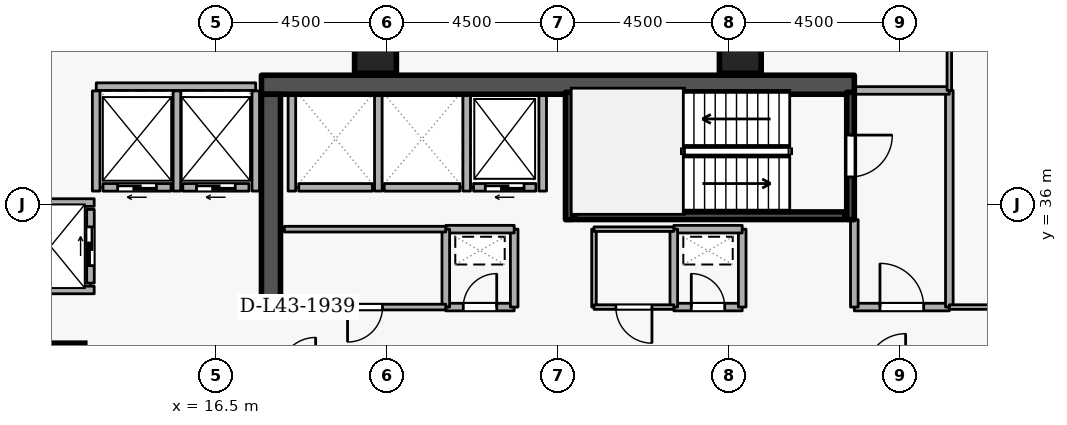
"""IFC4 building model, lengths in metres.
Left out: names, types, materials, properties, quantities, classifications, styles, units other than length and angle.
Written with IfcOpenShell. Run it as: python <this file> out.ifc"""

import sys

from ifc_helpers import new_model, si_unit, direction, frame, frame_2d, origin, origin_2d, place, context, subcontext, project, spatial, rectangle, extrude, element, fill, save


model = new_model("IFC4")
c1 = context("Model", 3, precision=1e-05, world=origin(), true_north=direction((0.0, 1.0)))
c2 = subcontext(c1, "Body", "Model", "MODEL_VIEW")
j1 = project(units=[si_unit("LENGTHUNIT", "METRE"), si_unit("PLANEANGLEUNIT", "RADIAN")], contexts=[c1])
p1 = place(None, origin())
s1 = spatial("IfcSite", under=j1, at=p1, CompositionType="ELEMENT")
p2 = place(p1, origin())
s2 = spatial("IfcBuilding", under=s1, at=p2, CompositionType="ELEMENT")
p3 = place(p2, frame((0.0, 0.0, 163.5)))
s3 = spatial("IfcBuildingStorey", under=s2, at=p3, CompositionType="ELEMENT", Elevation=163.5)
p4 = place(p3, frame((17.7, 39.15, 0.0), z_axis=(0.0, 0.0, 1.0), x_axis=(1.0, 0.0, 0.0)))
e1 = element("IfcWall", 1, at=p4, inside=s3, PredefinedType="SHEAR", context=c2, shape_type="SweptSolid", body=[
    extrude(rectangle(XDim=15.6, YDim=0.5, at=frame_2d((7.8, 0.0))), origin(), (0.0, 0.0, 1.0), 3.6),
])
p5 = place(p3, frame((17.95, 33.1, 0.0), z_axis=(0.0, 0.0, 1.0), x_axis=(0.0, 1.0, 0.0)))
e2 = element("IfcWall", 2, at=p5, inside=s3, PredefinedType="SHEAR", context=c2, shape_type="SweptSolid", body=[
    extrude(rectangle(XDim=5.8, YDim=0.5, at=frame_2d((2.9, 0.0))), origin(), (0.0, 0.0, 1.0), 3.6),
])
for number, where, z_axis, x_axis in (
    (3, (12.5, 31.8, 0.0), (0.0, 0.0, 1.0), (1.0, 0.0, 0.0)),
    (4, (20.7, 40.0, 0.0), (0.0, 0.0, 1.0), (1.0, 0.0, 0.0)),
    (5, (30.3, 40.0, 0.0), (0.0, 0.0, 1.0), (1.0, 0.0, 0.0)),
):
    element("IfcColumn", number, at=place(p3, frame(where, z_axis=z_axis, x_axis=x_axis)), inside=s3, PredefinedType="COLUMN", context=c2, shape_type="SweptSolid", body=[
        extrude(rectangle(XDim=1.1, YDim=1.1, at=origin_2d()), origin(), (0.0, 0.0, 1.0), 3.6),
    ])
p6 = place(p3, frame((24.92, 36.45, 0.0), z_axis=(0.0, 0.0, 1.0), x_axis=(-1.0, 0.0, 0.0)))
e6 = element("IfcWall", 6, at=p6, inside=s3, PredefinedType="STANDARD", context=c2, shape_type="SweptSolid", body=[
    extrude(rectangle(XDim=1.64, YDim=0.2, at=frame_2d((0.82, 0.0))), origin(), (0.0, 0.0, 1.0), 3.34),
])
p7 = place(p6, frame((0.31, 0.0, 0.0)))
e7 = element("IfcOpeningElement", 7, at=p7, cuts=e6, PredefinedType="OPENING", context=c2, shape_type="SweptSolid", body=[
    extrude(rectangle(XDim=1.02, YDim=2.06, at=frame_2d((0.51, 1.03))), frame((0.0, 0.11, 0.0), z_axis=(0.0, -1.0, 0.0), x_axis=(1.0, 0.0, 0.0)), (0.0, 0.0, 1.0), 0.22),
])
p8 = place(p3, frame((22.92, 36.45, 0.0), z_axis=(0.0, 0.0, 1.0), x_axis=(-1.0, 0.0, 0.0)))
e8 = element("IfcWall", 8, at=p8, inside=s3, PredefinedType="STANDARD", context=c2, shape_type="SweptSolid", body=[
    extrude(rectangle(XDim=1.99, YDim=0.2, at=frame_2d((0.995, 0.0))), origin(), (0.0, 0.0, 1.0), 3.34),
])
p9 = place(p3, frame((20.62, 36.45, 0.0), z_axis=(0.0, 0.0, 1.0), x_axis=(-1.0, 0.0, 0.0)))
e9 = element("IfcWall", 9, at=p9, inside=s3, PredefinedType="STANDARD", context=c2, shape_type="SweptSolid", body=[
    extrude(rectangle(XDim=1.94, YDim=0.2, at=frame_2d((0.97, 0.0))), origin(), (0.0, 0.0, 1.0), 3.34),
])
p10 = place(p3, frame((17.37, 36.45, 0.0), z_axis=(0.0, 0.0, 1.0), x_axis=(-1.0, 0.0, 0.0)))
e10 = element("IfcWall", 10, at=p10, inside=s3, PredefinedType="STANDARD", context=c2, shape_type="SweptSolid", body=[
    extrude(rectangle(XDim=1.74, YDim=0.2, at=frame_2d((0.87, 0.0))), origin(), (0.0, 0.0, 1.0), 3.34),
])
p11 = place(p10, frame((0.36, 0.0, 0.0)))
e11 = element("IfcOpeningElement", 11, at=p11, cuts=e10, PredefinedType="OPENING", context=c2, shape_type="SweptSolid", body=[
    extrude(rectangle(XDim=1.02, YDim=2.06, at=frame_2d((0.51, 1.03))), frame((0.0, 0.11, 0.0), z_axis=(0.0, -1.0, 0.0), x_axis=(1.0, 0.0, 0.0)), (0.0, 0.0, 1.0), 0.22),
])
p12 = place(p3, frame((15.32, 36.45, 0.0), z_axis=(0.0, 0.0, 1.0), x_axis=(-1.0, 0.0, 0.0)))
e12 = element("IfcWall", 12, at=p12, inside=s3, PredefinedType="STANDARD", context=c2, shape_type="SweptSolid", body=[
    extrude(rectangle(XDim=1.79, YDim=0.2, at=frame_2d((0.895, 0.0))), origin(), (0.0, 0.0, 1.0), 3.34),
])
p13 = place(p12, frame((0.385, 0.0, 0.0)))
e13 = element("IfcOpeningElement", 13, at=p13, cuts=e12, PredefinedType="OPENING", context=c2, shape_type="SweptSolid", body=[
    extrude(rectangle(XDim=1.02, YDim=2.06, at=frame_2d((0.51, 1.03))), frame((0.0, 0.11, 0.0), z_axis=(0.0, -1.0, 0.0), x_axis=(1.0, 0.0, 0.0)), (0.0, 0.0, 1.0), 0.22),
])
p14 = place(p3, frame((13.2, 33.93, 0.0), z_axis=(0.0, 0.0, 1.0), x_axis=(0.0, 1.0, 0.0)))
e14 = element("IfcWall", 14, at=p14, inside=s3, PredefinedType="STANDARD", context=c2, shape_type="SweptSolid", body=[
    extrude(rectangle(XDim=1.94, YDim=0.2, at=frame_2d((0.97, 0.0))), origin(), (0.0, 0.0, 1.0), 3.34),
])
p15 = place(p14, frame((0.46, 0.0, 0.0)))
e15 = element("IfcOpeningElement", 15, at=p15, cuts=e14, PredefinedType="OPENING", context=c2, shape_type="SweptSolid", body=[
    extrude(rectangle(XDim=1.02, YDim=2.06, at=frame_2d((0.51, 1.03))), frame((0.0, 0.11, 0.0), z_axis=(0.0, -1.0, 0.0), x_axis=(1.0, 0.0, 0.0)), (0.0, 0.0, 1.0), 0.22),
])
for number, where, z_axis, x_axis in (
    (16, (25.1, 36.352, 0.0), (0.0, 0.0, 1.0), (0.0, 1.0, 0.0)),
    (17, (23.1, 36.352, 0.0), (0.0, 0.0, 1.0), (0.0, 1.0, 0.0)),
    (18, (20.775, 36.352, 0.0), (0.0, 0.0, 1.0), (0.0, 1.0, 0.0)),
    (19, (18.5, 36.352, 0.0), (0.0, 0.0, 1.0), (0.0, 1.0, 0.0)),
):
    element("IfcWall", number, at=place(p3, frame(where, z_axis=z_axis, x_axis=x_axis)), inside=s3, PredefinedType="STANDARD", context=c2, shape_type="SweptSolid", body=[
        extrude(rectangle(XDim=2.536, YDim=0.2, at=frame_2d((1.268, 0.0))), origin(), (0.0, 0.0, 1.0), 3.34),
    ])
p16 = place(p3, frame((13.352, 39.1, 0.0), z_axis=(0.0, 0.0, 1.0), x_axis=(1.0, 0.0, 0.0)))
e20 = element("IfcWall", 20, at=p16, inside=s3, PredefinedType="STANDARD", context=c2, shape_type="SweptSolid", body=[
    extrude(rectangle(XDim=4.196, YDim=0.2, at=frame_2d((2.098, 0.0))), origin(), (0.0, 0.0, 1.0), 3.34),
])
p17 = place(p3, frame((17.55, 36.352, 0.0), z_axis=(0.0, 0.0, 1.0), x_axis=(0.0, 1.0, 0.0)))
e21 = element("IfcWall", 21, at=p17, inside=s3, PredefinedType="STANDARD", context=c2, shape_type="SweptSolid", body=[
    extrude(rectangle(XDim=2.636, YDim=0.2, at=frame_2d((1.318, 0.0))), origin(), (0.0, 0.0, 1.0), 2.545),
])
for number, where, z_axis, x_axis in (
    (22, (15.475, 36.352, 0.0), (0.0, 0.0, 1.0), (0.0, 1.0, 0.0)),
    (23, (13.35, 36.352, 0.0), (0.0, 0.0, 1.0), (0.0, 1.0, 0.0)),
):
    element("IfcWall", number, at=place(p3, frame(where, z_axis=z_axis, x_axis=x_axis)), inside=s3, PredefinedType="STANDARD", context=c2, shape_type="SweptSolid", body=[
        extrude(rectangle(XDim=2.636, YDim=0.2, at=frame_2d((1.318, 0.0))), origin(), (0.0, 0.0, 1.0), 3.34),
    ])
for number, where, z_axis, x_axis in (
    (24, (11.002, 36.05, 0.0), (0.0, 0.0, 1.0), (1.0, 0.0, 0.0)),
    (25, (11.002, 33.75, 0.0), (0.0, 0.0, 1.0), (1.0, 0.0, 0.0)),
):
    element("IfcWall", number, at=place(p3, frame(where, z_axis=z_axis, x_axis=x_axis)), inside=s3, PredefinedType="STANDARD", context=c2, shape_type="SweptSolid", body=[
        extrude(rectangle(XDim=2.296, YDim=0.2, at=frame_2d((1.148, 0.0))), origin(), (0.0, 0.0, 1.0), 3.34),
    ])
p18 = place(p3, frame((33.2, 38.95, 0.0), z_axis=(0.0, 0.0, 1.0), x_axis=(0.0, -1.0, 0.0)))
e26 = element("IfcWall", 26, at=p18, inside=s3, PredefinedType="SHEAR", context=c2, shape_type="SweptSolid", body=[
    extrude(rectangle(XDim=3.35, YDim=0.2, at=frame_2d((1.675, 0.0))), origin(), (0.0, 0.0, 1.0), 3.6),
])
p19 = place(p18, frame((1.125, 0.0, 0.0)))
e27 = element("IfcOpeningElement", 27, at=p19, cuts=e26, PredefinedType="OPENING", context=c2, shape_type="SweptSolid", body=[
    extrude(rectangle(XDim=1.1, YDim=2.1, at=frame_2d((0.55, 1.05))), frame((0.0, 0.11, 0.0), z_axis=(0.0, -1.0, 0.0), x_axis=(1.0, 0.0, 0.0)), (0.0, 0.0, 1.0), 0.22),
])
p20 = place(p3, frame((25.8, 35.6, 0.0), z_axis=(0.0, 0.0, 1.0), x_axis=(0.0, 1.0, 0.0)))
e28 = element("IfcWall", 28, at=p20, inside=s3, PredefinedType="SHEAR", context=c2, shape_type="SweptSolid", body=[
    extrude(rectangle(XDim=3.35, YDim=0.2, at=frame_2d((1.675, 0.0))), origin(), (0.0, 0.0, 1.0), 3.6),
])
p21 = place(p3, frame((25.95, 35.703, 0.0), z_axis=(0.0, 0.0, 1.0), x_axis=(1.0, 0.0, 0.0)))
e29 = element("IfcWall", 29, at=p21, inside=s3, PredefinedType="SHEAR", context=c2, shape_type="SweptSolid", body=[
    extrude(rectangle(XDim=7.1, YDim=0.2, at=frame_2d((3.55, 0.0))), origin(), (0.0, 0.0, 1.0), 3.6),
])
p22 = place(p3, frame((33.3, 33.3, 0.0), z_axis=(0.0, 0.0, 1.0), x_axis=(1.0, 0.0, 0.0)))
e30 = element("IfcWall", 30, at=p22, inside=s3, PredefinedType="STANDARD", context=c2, shape_type="SweptSolid", body=[
    extrude(rectangle(XDim=2.5, YDim=0.2, at=frame_2d((1.25, 0.0))), origin(), (0.0, 0.0, 1.0), 3.34),
])
p23 = place(p22, frame((0.675, 0.0, 0.0)))
e31 = element("IfcOpeningElement", 31, at=p23, cuts=e30, PredefinedType="OPENING", context=c2, shape_type="SweptSolid", body=[
    extrude(rectangle(XDim=1.15, YDim=2.1, at=frame_2d((0.575, 1.05))), frame((0.0, 0.11, 0.0), z_axis=(0.0, -1.0, 0.0), x_axis=(1.0, 0.0, 0.0)), (0.0, 0.0, 1.0), 0.22),
])
p24 = place(p3, frame((35.8, 33.3, 0.0), z_axis=(0.0, 0.0, 1.0), x_axis=(0.0, 1.0, 0.0)))
e32 = element("IfcWall", 32, at=p24, inside=s3, PredefinedType="STANDARD", context=c2, shape_type="SweptSolid", body=[
    extrude(rectangle(XDim=5.7, YDim=0.2, at=frame_2d((2.85, 0.0))), origin(), (0.0, 0.0, 1.0), 3.34),
])
p25 = place(p3, frame((35.8, 39.0, 0.0), z_axis=(0.0, 0.0, 1.0), x_axis=(-1.0, 0.0, 0.0)))
e33 = element("IfcWall", 33, at=p25, inside=s3, PredefinedType="STANDARD", context=c2, shape_type="SweptSolid", body=[
    extrude(rectangle(XDim=2.5, YDim=0.2, at=frame_2d((1.25, 0.0))), origin(), (0.0, 0.0, 1.0), 3.34),
])
p26 = place(p3, frame((33.3, 35.6, 0.0), z_axis=(0.0, 0.0, 1.0), x_axis=(0.0, -1.0, 0.0)))
e34 = element("IfcWall", 34, at=p26, inside=s3, PredefinedType="STANDARD", context=c2, shape_type="SweptSolid", body=[
    extrude(rectangle(XDim=2.3, YDim=0.2, at=frame_2d((1.15, 0.0))), origin(), (0.0, 0.0, 1.0), 2.545),
])
p27 = place(p3, frame((22.55, 33.3, 0.0), z_axis=(0.0, 0.0, 1.0), x_axis=(1.0, 0.0, 0.0)))
e35 = element("IfcWall", 35, at=p27, inside=s3, PredefinedType="STANDARD", context=c2, shape_type="SweptSolid", body=[
    extrude(rectangle(XDim=1.8, YDim=0.2, at=frame_2d((0.9, 0.0))), origin(), (0.0, 0.0, 1.0), 3.34),
])
p28 = place(p27, frame((0.46, 0.0, 0.0)))
e36 = element("IfcOpeningElement", 36, at=p28, cuts=e35, PredefinedType="OPENING", context=c2, shape_type="SweptSolid", body=[
    extrude(rectangle(XDim=0.88, YDim=2.04, at=frame_2d((0.44, 1.02))), frame((0.0, 0.11, 0.0), z_axis=(0.0, -1.0, 0.0), x_axis=(1.0, 0.0, 0.0)), (0.0, 0.0, 1.0), 0.22),
])
p29 = place(p3, frame((24.35, 33.3, 0.0), z_axis=(0.0, 0.0, 1.0), x_axis=(0.0, 1.0, 0.0)))
e37 = element("IfcWall", 37, at=p29, inside=s3, PredefinedType="STANDARD", context=c2, shape_type="SweptSolid", body=[
    extrude(rectangle(XDim=2.05, YDim=0.2, at=frame_2d((1.025, 0.0))), origin(), (0.0, 0.0, 1.0), 3.34),
])
p30 = place(p3, frame((24.35, 35.35, 0.0), z_axis=(0.0, 0.0, 1.0), x_axis=(-1.0, 0.0, 0.0)))
e38 = element("IfcWall", 38, at=p30, inside=s3, PredefinedType="STANDARD", context=c2, shape_type="SweptSolid", body=[
    extrude(rectangle(XDim=1.8, YDim=0.2, at=frame_2d((0.9, 0.0))), origin(), (0.0, 0.0, 1.0), 3.34),
])
p31 = place(p3, frame((22.55, 35.35, 0.0), z_axis=(0.0, 0.0, 1.0), x_axis=(0.0, -1.0, 0.0)))
e39 = element("IfcWall", 39, at=p31, inside=s3, PredefinedType="STANDARD", context=c2, shape_type="SweptSolid", body=[
    extrude(rectangle(XDim=2.05, YDim=0.2, at=frame_2d((1.025, 0.0))), origin(), (0.0, 0.0, 1.0), 3.34),
])
p32 = place(p3, frame((28.55, 33.3, 0.0), z_axis=(0.0, 0.0, 1.0), x_axis=(1.0, 0.0, 0.0)))
e40 = element("IfcWall", 40, at=p32, inside=s3, PredefinedType="STANDARD", context=c2, shape_type="SweptSolid", body=[
    extrude(rectangle(XDim=1.8, YDim=0.2, at=frame_2d((0.9, 0.0))), origin(), (0.0, 0.0, 1.0), 3.34),
])
p33 = place(p32, frame((0.46, 0.0, 0.0)))
e41 = element("IfcOpeningElement", 41, at=p33, cuts=e40, PredefinedType="OPENING", context=c2, shape_type="SweptSolid", body=[
    extrude(rectangle(XDim=0.88, YDim=2.04, at=frame_2d((0.44, 1.02))), frame((0.0, 0.11, 0.0), z_axis=(0.0, -1.0, 0.0), x_axis=(1.0, 0.0, 0.0)), (0.0, 0.0, 1.0), 0.22),
])
p34 = place(p3, frame((30.35, 33.3, 0.0), z_axis=(0.0, 0.0, 1.0), x_axis=(0.0, 1.0, 0.0)))
e42 = element("IfcWall", 42, at=p34, inside=s3, PredefinedType="STANDARD", context=c2, shape_type="SweptSolid", body=[
    extrude(rectangle(XDim=2.05, YDim=0.2, at=frame_2d((1.025, 0.0))), origin(), (0.0, 0.0, 1.0), 3.34),
])
p35 = place(p3, frame((30.35, 35.35, 0.0), z_axis=(0.0, 0.0, 1.0), x_axis=(-1.0, 0.0, 0.0)))
e43 = element("IfcWall", 43, at=p35, inside=s3, PredefinedType="STANDARD", context=c2, shape_type="SweptSolid", body=[
    extrude(rectangle(XDim=1.8, YDim=0.2, at=frame_2d((0.9, 0.0))), origin(), (0.0, 0.0, 1.0), 3.34),
])
p36 = place(p3, frame((28.55, 35.35, 0.0), z_axis=(0.0, 0.0, 1.0), x_axis=(0.0, -1.0, 0.0)))
e44 = element("IfcWall", 44, at=p36, inside=s3, PredefinedType="STANDARD", context=c2, shape_type="SweptSolid", body=[
    extrude(rectangle(XDim=2.05, YDim=0.2, at=frame_2d((1.025, 0.0))), origin(), (0.0, 0.0, 1.0), 3.34),
])
p37 = place(p3, frame((18.3, 35.35, 0.0), z_axis=(0.0, 0.0, 1.0), x_axis=(1.0, 0.0, 0.0)))
e45 = element("IfcWall", 45, at=p37, inside=s3, PredefinedType="PARTITIONING", context=c2, shape_type="SweptSolid", body=[
    extrude(rectangle(XDim=4.25, YDim=0.15, at=frame_2d((2.125, 0.0))), origin(), (0.0, 0.0, 1.0), 3.34),
])
p38 = place(p3, frame((22.55, 33.3, 0.0), z_axis=(0.0, 0.0, 1.0), x_axis=(-1.0, 0.0, 0.0)))
e46 = element("IfcWall", 46, at=p38, inside=s3, PredefinedType="PARTITIONING", context=c2, shape_type="SweptSolid", body=[
    extrude(rectangle(XDim=4.25, YDim=0.15, at=frame_2d((2.125, 0.0))), origin(), (0.0, 0.0, 1.0), 3.34),
])
p39 = place(p38, frame((1.665, 0.0, 0.0)))
e47 = element("IfcOpeningElement", 47, at=p39, cuts=e46, PredefinedType="OPENING", context=c2, shape_type="SweptSolid", body=[
    extrude(rectangle(XDim=0.92, YDim=2.08, at=frame_2d((0.46, 1.04))), frame((0.0, 0.085, 0.0), z_axis=(0.0, -1.0, 0.0), x_axis=(1.0, 0.0, 0.0)), (0.0, 0.0, 1.0), 0.17),
])
p40 = place(p3, frame((26.45, 33.3, 0.0), z_axis=(0.0, 0.0, 1.0), x_axis=(0.0, 1.0, 0.0)))
e48 = element("IfcWall", 48, at=p40, inside=s3, PredefinedType="PARTITIONING", context=c2, shape_type="SweptSolid", body=[
    extrude(rectangle(XDim=2.05, YDim=0.12, at=frame_2d((1.025, 0.0))), origin(), (0.0, 0.0, 1.0), 3.34),
])
p41 = place(p3, frame((26.45, 35.35, 0.0), z_axis=(0.0, 0.0, 1.0), x_axis=(1.0, 0.0, 0.0)))
e49 = element("IfcWall", 49, at=p41, inside=s3, PredefinedType="PARTITIONING", context=c2, shape_type="SweptSolid", body=[
    extrude(rectangle(XDim=2.1, YDim=0.12, at=frame_2d((1.05, 0.0))), origin(), (0.0, 0.0, 1.0), 3.34),
])
p42 = place(p3, frame((28.55, 33.3, 0.0), z_axis=(0.0, 0.0, 1.0), x_axis=(-1.0, 0.0, 0.0)))
e50 = element("IfcWall", 50, at=p42, inside=s3, PredefinedType="PARTITIONING", context=c2, shape_type="SweptSolid", body=[
    extrude(rectangle(XDim=2.1, YDim=0.12, at=frame_2d((1.05, 0.0))), origin(), (0.0, 0.0, 1.0), 3.34),
])
p43 = place(p42, frame((0.575, 0.0, 0.0)))
e51 = element("IfcOpeningElement", 51, at=p43, cuts=e50, PredefinedType="OPENING", context=c2, shape_type="SweptSolid", body=[
    extrude(rectangle(XDim=0.95, YDim=2.1, at=frame_2d((0.475, 1.05))), frame((0.0, 0.07, 0.0), z_axis=(0.0, -1.0, 0.0), x_axis=(1.0, 0.0, 0.0)), (0.0, 0.0, 1.0), 0.14),
])
p44 = place(p3, frame((37.75, 33.3, 0.0), z_axis=(0.0, 0.0, 1.0), x_axis=(-1.0, 0.0, 0.0)))
e52 = element("IfcWall", 52, at=p44, inside=s3, PredefinedType="PARTITIONING", context=c2, shape_type="SweptSolid", body=[
    extrude(rectangle(XDim=1.95, YDim=0.12, at=frame_2d((0.975, 0.0))), origin(), (0.0, 0.0, 1.0), 3.34),
])
p45 = place(p3, frame((35.8, 39.0, 0.0), z_axis=(0.0, 0.0, 1.0), x_axis=(0.0, 1.0, 0.0)))
e53 = element("IfcWall", 53, at=p45, inside=s3, PredefinedType="PARTITIONING", context=c2, shape_type="SweptSolid", body=[
    extrude(rectangle(XDim=5.72, YDim=0.12, at=frame_2d((2.86, 0.0))), origin(), (0.0, 0.0, 1.0), 3.34),
])
p46 = place(p7, origin())
e54 = element("IfcDoor", 54, at=p46, inside=s3, OperationType="SLIDING_TO_LEFT", PredefinedType="DOOR", context=c2, shape_type="SweptSolid", body=[
    extrude(rectangle(XDim=1.02, YDim=2.06, at=frame_2d((0.51, 1.03))), frame((0.0, 0.025, 0.0), z_axis=(0.0, -1.0, 0.0), x_axis=(1.0, 0.0, 0.0)), (0.0, 0.0, 1.0), 0.05),
])
fill(e7, e54)
p47 = place(p11, origin())
e55 = element("IfcDoor", 55, at=p47, inside=s3, OperationType="SLIDING_TO_LEFT", PredefinedType="DOOR", context=c2, shape_type="SweptSolid", body=[
    extrude(rectangle(XDim=1.02, YDim=2.06, at=frame_2d((0.51, 1.03))), frame((0.0, 0.025, 0.0), z_axis=(0.0, -1.0, 0.0), x_axis=(1.0, 0.0, 0.0)), (0.0, 0.0, 1.0), 0.05),
])
fill(e11, e55)
p48 = place(p13, origin())
e56 = element("IfcDoor", 56, at=p48, inside=s3, OperationType="SLIDING_TO_LEFT", PredefinedType="DOOR", context=c2, shape_type="SweptSolid", body=[
    extrude(rectangle(XDim=1.02, YDim=2.06, at=frame_2d((0.51, 1.03))), frame((0.0, 0.025, 0.0), z_axis=(0.0, -1.0, 0.0), x_axis=(1.0, 0.0, 0.0)), (0.0, 0.0, 1.0), 0.05),
])
fill(e13, e56)
p49 = place(p15, origin())
e57 = element("IfcDoor", 57, at=p49, inside=s3, OperationType="SLIDING_TO_LEFT", PredefinedType="DOOR", context=c2, shape_type="SweptSolid", body=[
    extrude(rectangle(XDim=1.02, YDim=2.06, at=frame_2d((0.51, 1.03))), frame((0.0, 0.025, 0.0), z_axis=(0.0, -1.0, 0.0), x_axis=(1.0, 0.0, 0.0)), (0.0, 0.0, 1.0), 0.05),
])
fill(e15, e57)
p50 = place(p19, origin())
e58 = element("IfcDoor", 58, at=p50, inside=s3, OperationType="SINGLE_SWING_LEFT", PredefinedType="DOOR", context=c2, shape_type="SweptSolid", body=[
    extrude(rectangle(XDim=1.1, YDim=2.1, at=frame_2d((0.55, 1.05))), frame((0.0, 0.025, 0.0), z_axis=(0.0, -1.0, 0.0), x_axis=(1.0, 0.0, 0.0)), (0.0, 0.0, 1.0), 0.05),
])
fill(e27, e58)
p51 = place(p23, origin())
e59 = element("IfcDoor", 59, at=p51, inside=s3, OperationType="SINGLE_SWING_LEFT", PredefinedType="DOOR", context=c2, shape_type="SweptSolid", body=[
    extrude(rectangle(XDim=1.15, YDim=2.1, at=frame_2d((0.575, 1.05))), frame((0.0, 0.025, 0.0), z_axis=(0.0, -1.0, 0.0), x_axis=(1.0, 0.0, 0.0)), (0.0, 0.0, 1.0), 0.05),
])
fill(e31, e59)
p52 = place(p28, origin())
e60 = element("IfcDoor", 60, at=p52, inside=s3, OperationType="SINGLE_SWING_RIGHT", PredefinedType="DOOR", context=c2, shape_type="SweptSolid", body=[
    extrude(rectangle(XDim=0.88, YDim=2.04, at=frame_2d((0.44, 1.02))), frame((0.0, 0.025, 0.0), z_axis=(0.0, -1.0, 0.0), x_axis=(1.0, 0.0, 0.0)), (0.0, 0.0, 1.0), 0.05),
])
fill(e36, e60)
p53 = place(p33, origin())
e61 = element("IfcDoor", 61, at=p53, inside=s3, OperationType="SINGLE_SWING_LEFT", PredefinedType="DOOR", context=c2, shape_type="SweptSolid", body=[
    extrude(rectangle(XDim=0.88, YDim=2.04, at=frame_2d((0.44, 1.02))), frame((0.0, 0.025, 0.0), z_axis=(0.0, -1.0, 0.0), x_axis=(1.0, 0.0, 0.0)), (0.0, 0.0, 1.0), 0.05),
])
fill(e41, e61)
p54 = place(p39, origin())
e62 = element("IfcDoor", 62, at=p54, inside=s3, OperationType="SINGLE_SWING_RIGHT", PredefinedType="DOOR", context=c2, shape_type="SweptSolid", body=[
    extrude(rectangle(XDim=0.92, YDim=2.08, at=frame_2d((0.46, 1.04))), frame((0.0, 0.025, 0.0), z_axis=(0.0, -1.0, 0.0), x_axis=(1.0, 0.0, 0.0)), (0.0, 0.0, 1.0), 0.05),
])
fill(e47, e62)
p55 = place(p43, origin())
e63 = element("IfcDoor", 63, at=p55, inside=s3, OperationType="SINGLE_SWING_LEFT", PredefinedType="DOOR", context=c2, shape_type="SweptSolid", body=[
    extrude(rectangle(XDim=0.95, YDim=2.1, at=frame_2d((0.475, 1.05))), frame((0.0, 0.025, 0.0), z_axis=(0.0, -1.0, 0.0), x_axis=(1.0, 0.0, 0.0)), (0.0, 0.0, 1.0), 0.05),
])
fill(e51, e63)
save(model, sys.argv[1])
